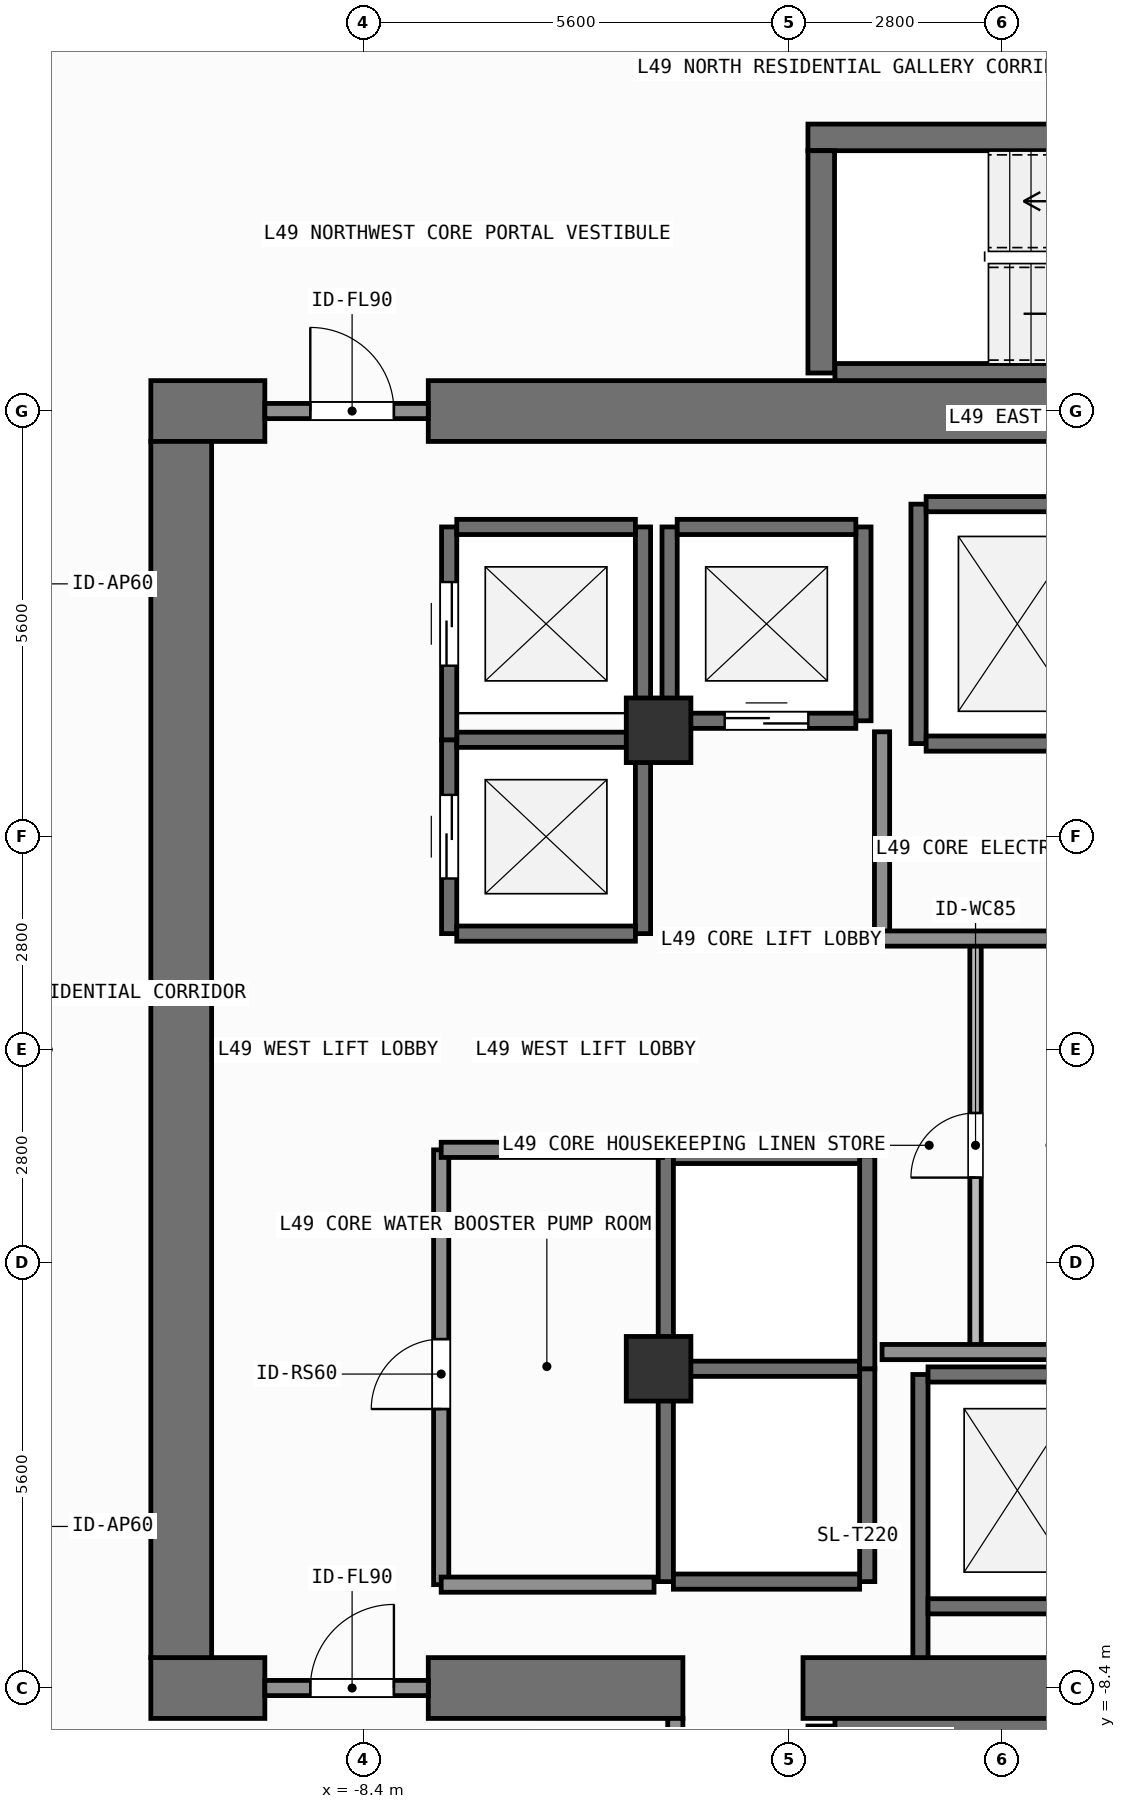
"""IFC4 building model, lengths in metres.
Left out: names, types, materials, properties, quantities, classifications, styles, units other than length and angle.
Written with IfcOpenShell. Run it as: python <this file> out.ifc"""

import sys

from ifc_helpers import new_model, si_unit, direction, frame, frame_2d, origin, origin_2d, place, context, subcontext, project, spatial, rectangle, extrude, element, fill, save


model = new_model("IFC4")
c1 = context("Model", 3, precision=1e-05, world=origin(), true_north=direction((0.0, 1.0)))
c2 = subcontext(c1, "Body", "Model", "MODEL_VIEW")
j1 = project(units=[si_unit("LENGTHUNIT", "METRE"), si_unit("PLANEANGLEUNIT", "RADIAN")], contexts=[c1])
p1 = place(None, origin())
s1 = spatial("IfcSite", under=j1, at=p1, CompositionType="ELEMENT")
p2 = place(p1, origin())
s2 = spatial("IfcBuilding", under=s1, at=p2, CompositionType="ELEMENT")
p3 = place(p2, frame((0.0, 0.0, 199.2)))
s3 = spatial("IfcBuildingStorey", under=s2, at=p3, CompositionType="ELEMENT", Elevation=199.2)
p4 = place(p3, frame((-11.2, -8.4, 0.0), z_axis=(0.0, 0.0, 1.0), x_axis=(1.0, 0.0, 0.0)))
e1 = element("IfcWall", 1, at=p4, inside=s3, PredefinedType="SHEAR", context=c2, shape_type="SweptSolid", body=[
    extrude(rectangle(XDim=1.5, YDim=0.8, at=frame_2d((0.75, 0.0))), origin(), (0.0, 0.0, 1.0), 3.9),
])
p5 = place(p3, frame((-7.55, -8.4, 0.0), z_axis=(0.0, 0.0, 1.0), x_axis=(1.0, 0.0, 0.0)))
e2 = element("IfcWall", 2, at=p5, inside=s3, PredefinedType="SHEAR", context=c2, shape_type="SweptSolid", body=[
    extrude(rectangle(XDim=3.35, YDim=0.8, at=frame_2d((1.675, 0.0))), origin(), (0.0, 0.0, 1.0), 3.9),
])
p6 = place(p3, frame((-2.62, -8.4, 0.0), z_axis=(0.0, 0.0, 1.0), x_axis=(1.0, 0.0, 0.0)))
e3 = element("IfcWall", 3, at=p6, inside=s3, PredefinedType="SHEAR", context=c2, shape_type="SweptSolid", body=[
    extrude(rectangle(XDim=7.27, YDim=0.8, at=frame_2d((3.635, 0.0))), origin(), (0.0, 0.0, 1.0), 3.9),
])
p7 = place(p3, frame((-11.2, 8.4, 0.0), z_axis=(0.0, 0.0, 1.0), x_axis=(1.0, 0.0, 0.0)))
e4 = element("IfcWall", 4, at=p7, inside=s3, PredefinedType="SHEAR", context=c2, shape_type="SweptSolid", body=[
    extrude(rectangle(XDim=1.5, YDim=0.8, at=frame_2d((0.75, 0.0))), origin(), (0.0, 0.0, 1.0), 3.9),
])
p8 = place(p3, frame((-7.55, 8.4, 0.0), z_axis=(0.0, 0.0, 1.0), x_axis=(1.0, 0.0, 0.0)))
e5 = element("IfcWall", 5, at=p8, inside=s3, PredefinedType="SHEAR", context=c2, shape_type="SweptSolid", body=[
    extrude(rectangle(XDim=16.35, YDim=0.8, at=frame_2d((8.175, 0.0))), origin(), (0.0, 0.0, 1.0), 3.9),
])
p9 = place(p3, frame((-10.8, -8.0, 0.0), z_axis=(0.0, 0.0, 1.0), x_axis=(0.0, 1.0, 0.0)))
e6 = element("IfcWall", 6, at=p9, inside=s3, PredefinedType="SHEAR", context=c2, shape_type="SweptSolid", body=[
    extrude(rectangle(XDim=16.0, YDim=0.8, at=frame_2d((8.0, 0.0))), origin(), (0.0, 0.0, 1.0), 3.9),
])
p10 = place(p3, frame((-2.2, -8.913, 0.0), z_axis=(0.0, 0.0, 1.0), x_axis=(1.0, 0.0, 0.0)))
e7 = element("IfcWall", 7, at=p10, inside=s3, PredefinedType="SHEAR", context=c2, shape_type="SweptSolid", body=[
    extrude(rectangle(XDim=6.6, YDim=0.225, at=frame_2d((3.3, 0.0))), origin(), (0.0, 0.0, 1.0), 3.9),
])
p11 = place(p3, frame((-2.38, -11.825, 0.0), z_axis=(0.0, 0.0, 1.0), x_axis=(0.0, 1.0, 0.0)))
e8 = element("IfcWall", 8, at=p11, inside=s3, PredefinedType="SHEAR", context=c2, shape_type="SweptSolid", body=[
    extrude(rectangle(XDim=2.925, YDim=0.35, at=frame_2d((1.462, 0.0))), origin(), (0.0, 0.0, 1.0), 3.9),
])
p12 = place(p3, frame((-2.555, 12.0, 0.0), z_axis=(0.0, 0.0, 1.0), x_axis=(1.0, 0.0, 0.0)))
e9 = element("IfcWall", 9, at=p12, inside=s3, PredefinedType="SHEAR", context=c2, shape_type="SweptSolid", body=[
    extrude(rectangle(XDim=7.31, YDim=0.35, at=frame_2d((3.655, 0.0))), origin(), (0.0, 0.0, 1.0), 3.9),
])
p13 = place(p3, frame((-2.2, 8.913, 0.0), z_axis=(0.0, 0.0, 1.0), x_axis=(1.0, 0.0, 0.0)))
e10 = element("IfcWall", 10, at=p13, inside=s3, PredefinedType="SHEAR", context=c2, shape_type="SweptSolid", body=[
    extrude(rectangle(XDim=6.6, YDim=0.225, at=frame_2d((3.3, 0.0))), origin(), (0.0, 0.0, 1.0), 3.9),
])
p14 = place(p3, frame((-2.38, 8.9, 0.0), z_axis=(0.0, 0.0, 1.0), x_axis=(0.0, 1.0, 0.0)))
e11 = element("IfcWall", 11, at=p14, inside=s3, PredefinedType="SHEAR", context=c2, shape_type="SweptSolid", body=[
    extrude(rectangle(XDim=2.925, YDim=0.35, at=frame_2d((1.462, 0.0))), origin(), (0.0, 0.0, 1.0), 3.9),
])
for number, where, z_axis, x_axis in (
    (12, (-4.52, -4.2, 0.0), (0.0, 0.0, 1.0), (1.0, 0.0, 0.0)),
    (13, (-4.52, 4.2, 0.0), (0.0, 0.0, 1.0), (1.0, 0.0, 0.0)),
):
    element("IfcColumn", number, at=place(p3, frame(where, z_axis=z_axis, x_axis=x_axis)), inside=s3, PredefinedType="COLUMN", context=c2, shape_type="SweptSolid", body=[
        extrude(rectangle(XDim=0.85, YDim=0.85, at=origin_2d()), origin(), (0.0, 0.0, 1.0), 3.9),
    ])
p15 = place(p3, frame((-7.275, 1.525, 0.0), z_axis=(0.0, 0.0, 1.0), x_axis=(0.0, 1.0, 0.0)))
e14 = element("IfcWall", 14, at=p15, inside=s3, PredefinedType="SHEAR", context=c2, shape_type="SweptSolid", body=[
    extrude(rectangle(XDim=2.55, YDim=0.2, at=frame_2d((1.275, 0.0))), origin(), (0.0, 0.0, 1.0), 3.68),
])
p16 = place(p15, frame((0.725, 0.0, 0.0)))
e15 = element("IfcOpeningElement", 15, at=p16, cuts=e14, PredefinedType="OPENING", context=c2, shape_type="SweptSolid", body=[
    extrude(rectangle(XDim=1.1, YDim=2.2, at=frame_2d((0.55, 1.1))), frame((0.0, 0.11, 0.0), z_axis=(0.0, -1.0, 0.0), x_axis=(1.0, 0.0, 0.0)), (0.0, 0.0, 1.0), 0.22),
])
p17 = place(p3, frame((-4.725, 1.525, 0.0), z_axis=(0.0, 0.0, 1.0), x_axis=(0.0, 1.0, 0.0)))
e16 = element("IfcWall", 16, at=p17, inside=s3, PredefinedType="SHEAR", context=c2, shape_type="SweptSolid", body=[
    extrude(rectangle(XDim=2.55, YDim=0.2, at=frame_2d((1.275, 0.0))), origin(), (0.0, 0.0, 1.0), 3.68),
])
for number, where, z_axis, x_axis in (
    (17, (-7.175, 1.525, 0.0), (0.0, 0.0, 1.0), (1.0, 0.0, 0.0)),
    (18, (-7.175, 4.075, 0.0), (0.0, 0.0, 1.0), (1.0, 0.0, 0.0)),
):
    element("IfcWall", number, at=place(p3, frame(where, z_axis=z_axis, x_axis=x_axis)), inside=s3, PredefinedType="SHEAR", context=c2, shape_type="SweptSolid", body=[
        extrude(rectangle(XDim=2.35, YDim=0.2, at=frame_2d((1.175, 0.0))), origin(), (0.0, 0.0, 1.0), 3.68),
    ])
p18 = place(p3, frame((-7.275, 4.075, 0.0), z_axis=(0.0, 0.0, 1.0), x_axis=(0.0, 1.0, 0.0)))
e19 = element("IfcWall", 19, at=p18, inside=s3, PredefinedType="SHEAR", context=c2, shape_type="SweptSolid", body=[
    extrude(rectangle(XDim=2.8, YDim=0.2, at=frame_2d((1.4, 0.0))), origin(), (0.0, 0.0, 1.0), 3.68),
])
p19 = place(p18, frame((0.975, 0.0, 0.0)))
e20 = element("IfcOpeningElement", 20, at=p19, cuts=e19, PredefinedType="OPENING", context=c2, shape_type="SweptSolid", body=[
    extrude(rectangle(XDim=1.1, YDim=2.2, at=frame_2d((0.55, 1.1))), frame((0.0, 0.11, 0.0), z_axis=(0.0, -1.0, 0.0), x_axis=(1.0, 0.0, 0.0)), (0.0, 0.0, 1.0), 0.22),
])
p20 = place(p3, frame((-4.725, 4.075, 0.0), z_axis=(0.0, 0.0, 1.0), x_axis=(0.0, 1.0, 0.0)))
e21 = element("IfcWall", 21, at=p20, inside=s3, PredefinedType="SHEAR", context=c2, shape_type="SweptSolid", body=[
    extrude(rectangle(XDim=2.8, YDim=0.2, at=frame_2d((1.4, 0.0))), origin(), (0.0, 0.0, 1.0), 3.68),
])
p21 = place(p3, frame((-7.175, 6.875, 0.0), z_axis=(0.0, 0.0, 1.0), x_axis=(1.0, 0.0, 0.0)))
e22 = element("IfcWall", 22, at=p21, inside=s3, PredefinedType="SHEAR", context=c2, shape_type="SweptSolid", body=[
    extrude(rectangle(XDim=2.35, YDim=0.2, at=frame_2d((1.175, 0.0))), origin(), (0.0, 0.0, 1.0), 3.68),
])
for number, where, z_axis, x_axis in (
    (23, (-4.375, 4.325, 0.0), (0.0, 0.0, 1.0), (0.0, 1.0, 0.0)),
    (24, (-1.825, 4.325, 0.0), (0.0, 0.0, 1.0), (0.0, 1.0, 0.0)),
):
    element("IfcWall", number, at=place(p3, frame(where, z_axis=z_axis, x_axis=x_axis)), inside=s3, PredefinedType="SHEAR", context=c2, shape_type="SweptSolid", body=[
        extrude(rectangle(XDim=2.55, YDim=0.2, at=frame_2d((1.275, 0.0))), origin(), (0.0, 0.0, 1.0), 3.68),
    ])
p22 = place(p3, frame((-4.275, 4.325, 0.0), z_axis=(0.0, 0.0, 1.0), x_axis=(1.0, 0.0, 0.0)))
e25 = element("IfcWall", 25, at=p22, inside=s3, PredefinedType="SHEAR", context=c2, shape_type="SweptSolid", body=[
    extrude(rectangle(XDim=2.35, YDim=0.2, at=frame_2d((1.175, 0.0))), origin(), (0.0, 0.0, 1.0), 3.68),
])
p23 = place(p22, frame((0.625, 0.0, 0.0)))
e26 = element("IfcOpeningElement", 26, at=p23, cuts=e25, PredefinedType="OPENING", context=c2, shape_type="SweptSolid", body=[
    extrude(rectangle(XDim=1.1, YDim=2.2, at=frame_2d((0.55, 1.1))), frame((0.0, 0.11, 0.0), z_axis=(0.0, -1.0, 0.0), x_axis=(1.0, 0.0, 0.0)), (0.0, 0.0, 1.0), 0.22),
])
p24 = place(p3, frame((-4.275, 6.875, 0.0), z_axis=(0.0, 0.0, 1.0), x_axis=(1.0, 0.0, 0.0)))
e27 = element("IfcWall", 27, at=p24, inside=s3, PredefinedType="SHEAR", context=c2, shape_type="SweptSolid", body=[
    extrude(rectangle(XDim=2.35, YDim=0.2, at=frame_2d((1.175, 0.0))), origin(), (0.0, 0.0, 1.0), 3.68),
])
for number, where, z_axis, x_axis in (
    (28, (-4.425, -7.0, 0.0), (0.0, 0.0, 1.0), (0.0, 1.0, 0.0)),
    (29, (-1.775, -7.0, 0.0), (0.0, 0.0, 1.0), (0.0, 1.0, 0.0)),
):
    element("IfcWall", number, at=place(p3, frame(where, z_axis=z_axis, x_axis=x_axis)), inside=s3, PredefinedType="SHEAR", context=c2, shape_type="SweptSolid", body=[
        extrude(rectangle(XDim=2.8, YDim=0.2, at=frame_2d((1.4, 0.0))), origin(), (0.0, 0.0, 1.0), 3.68),
    ])
for number, where, z_axis, x_axis in (
    (30, (-4.325, -7.0, 0.0), (0.0, 0.0, 1.0), (1.0, 0.0, 0.0)),
    (31, (-4.325, -4.2, 0.0), (0.0, 0.0, 1.0), (1.0, 0.0, 0.0)),
):
    element("IfcWall", number, at=place(p3, frame(where, z_axis=z_axis, x_axis=x_axis)), inside=s3, PredefinedType="SHEAR", context=c2, shape_type="SweptSolid", body=[
        extrude(rectangle(XDim=2.45, YDim=0.2, at=frame_2d((1.225, 0.0))), origin(), (0.0, 0.0, 1.0), 3.68),
    ])
for number, where, z_axis, x_axis in (
    (32, (-4.425, -4.2, 0.0), (0.0, 0.0, 1.0), (0.0, 1.0, 0.0)),
    (33, (-1.775, -4.2, 0.0), (0.0, 0.0, 1.0), (0.0, 1.0, 0.0)),
):
    element("IfcWall", number, at=place(p3, frame(where, z_axis=z_axis, x_axis=x_axis)), inside=s3, PredefinedType="SHEAR", context=c2, shape_type="SweptSolid", body=[
        extrude(rectangle(XDim=2.8, YDim=0.2, at=frame_2d((1.4, 0.0))), origin(), (0.0, 0.0, 1.0), 3.68),
    ])
p25 = place(p3, frame((-4.325, -1.4, 0.0), z_axis=(0.0, 0.0, 1.0), x_axis=(1.0, 0.0, 0.0)))
e34 = element("IfcWall", 34, at=p25, inside=s3, PredefinedType="SHEAR", context=c2, shape_type="SweptSolid", body=[
    extrude(rectangle(XDim=2.45, YDim=0.2, at=frame_2d((1.225, 0.0))), origin(), (0.0, 0.0, 1.0), 3.68),
])
p26 = place(p3, frame((-1.1, 4.025, 0.0), z_axis=(0.0, 0.0, 1.0), x_axis=(0.0, 1.0, 0.0)))
e35 = element("IfcWall", 35, at=p26, inside=s3, PredefinedType="SHEAR", context=c2, shape_type="SweptSolid", body=[
    extrude(rectangle(XDim=3.15, YDim=0.2, at=frame_2d((1.575, 0.0))), origin(), (0.0, 0.0, 1.0), 3.68),
])
for number, where, z_axis, x_axis in (
    (36, (-1.0, 4.025, 0.0), (0.0, 0.0, 1.0), (1.0, 0.0, 0.0)),
    (37, (-1.0, 7.175, 0.0), (0.0, 0.0, 1.0), (1.0, 0.0, 0.0)),
):
    element("IfcWall", number, at=place(p3, frame(where, z_axis=z_axis, x_axis=x_axis)), inside=s3, PredefinedType="SHEAR", context=c2, shape_type="SweptSolid", body=[
        extrude(rectangle(XDim=2.4, YDim=0.2, at=frame_2d((1.2, 0.0))), origin(), (0.0, 0.0, 1.0), 3.68),
    ])
p27 = place(p3, frame((-1.075, -8.0, 0.0), z_axis=(0.0, 0.0, 1.0), x_axis=(0.0, 1.0, 0.0)))
e38 = element("IfcWall", 38, at=p27, inside=s3, PredefinedType="SHEAR", context=c2, shape_type="SweptSolid", body=[
    extrude(rectangle(XDim=3.725, YDim=0.2, at=frame_2d((1.863, 0.0))), origin(), (0.0, 0.0, 1.0), 3.68),
])
for number, where, z_axis, x_axis in (
    (39, (-0.975, -7.325, 0.0), (0.0, 0.0, 1.0), (1.0, 0.0, 0.0)),
    (40, (-0.975, -4.275, 0.0), (0.0, 0.0, 1.0), (1.0, 0.0, 0.0)),
):
    element("IfcWall", number, at=place(p3, frame(where, z_axis=z_axis, x_axis=x_axis)), inside=s3, PredefinedType="SHEAR", context=c2, shape_type="SweptSolid", body=[
        extrude(rectangle(XDim=2.35, YDim=0.2, at=frame_2d((1.175, 0.0))), origin(), (0.0, 0.0, 1.0), 3.68),
    ])
p28 = place(p3, frame((-9.7, -8.4, 0.0), z_axis=(0.0, 0.0, 1.0), x_axis=(1.0, 0.0, 0.0)))
e41 = element("IfcWall", 41, at=p28, inside=s3, PredefinedType="SOLIDWALL", context=c2, shape_type="SweptSolid", body=[
    extrude(rectangle(XDim=2.15, YDim=0.2, at=frame_2d((1.075, 0.0))), origin(), (0.0, 0.0, 1.0), 2.82),
])
p29 = place(p28, frame((0.598, 0.0, 0.0)))
e42 = element("IfcOpeningElement", 42, at=p29, cuts=e41, PredefinedType="OPENING", context=c2, shape_type="SweptSolid", body=[
    extrude(rectangle(XDim=1.1, YDim=2.15, at=frame_2d((0.55, 1.075))), frame((0.0, 0.11, 0.0), z_axis=(0.0, -1.0, 0.0), x_axis=(1.0, 0.0, 0.0)), (0.0, 0.0, 1.0), 0.22),
])
p30 = place(p3, frame((-9.7, 8.4, 0.0), z_axis=(0.0, 0.0, 1.0), x_axis=(1.0, 0.0, 0.0)))
e43 = element("IfcWall", 43, at=p30, inside=s3, PredefinedType="SOLIDWALL", context=c2, shape_type="SweptSolid", body=[
    extrude(rectangle(XDim=2.15, YDim=0.2, at=frame_2d((1.075, 0.0))), origin(), (0.0, 0.0, 1.0), 2.82),
])
p31 = place(p30, frame((0.598, 0.0, 0.0)))
e44 = element("IfcOpeningElement", 44, at=p31, cuts=e43, PredefinedType="OPENING", context=c2, shape_type="SweptSolid", body=[
    extrude(rectangle(XDim=1.1, YDim=2.15, at=frame_2d((0.55, 1.075))), frame((0.0, 0.11, 0.0), z_axis=(0.0, -1.0, 0.0), x_axis=(1.0, 0.0, 0.0)), (0.0, 0.0, 1.0), 0.22),
])
p32 = place(p3, frame((-0.35, -3.98, 0.0), z_axis=(0.0, 0.0, 1.0), x_axis=(0.0, 1.0, 0.0)))
e45 = element("IfcWall", 45, at=p32, inside=s3, PredefinedType="PARTITIONING", context=c2, shape_type="SweptSolid", body=[
    extrude(rectangle(XDim=5.44, YDim=0.15, at=frame_2d((2.72, 0.0))), origin(), (0.0, 0.0, 1.0), 3.68),
])
p33 = place(p32, frame((2.295, 0.0, 0.0)))
e46 = element("IfcOpeningElement", 46, at=p33, cuts=e45, PredefinedType="OPENING", context=c2, shape_type="SweptSolid", body=[
    extrude(rectangle(XDim=0.85, YDim=2.1, at=frame_2d((0.425, 1.05))), frame((0.0, 0.085, 0.0), z_axis=(0.0, -1.0, 0.0), x_axis=(1.0, 0.0, 0.0)), (0.0, 0.0, 1.0), 0.17),
])
p34 = place(p3, frame((-7.38, -7.04, 0.0), z_axis=(0.0, 0.0, 1.0), x_axis=(0.0, 1.0, 0.0)))
e47 = element("IfcWall", 47, at=p34, inside=s3, PredefinedType="SOLIDWALL", context=c2, shape_type="SweptSolid", body=[
    extrude(rectangle(XDim=5.72, YDim=0.2, at=frame_2d((2.86, 0.0))), origin(), (0.0, 0.0, 1.0), 3.68),
])
p35 = place(p34, frame((2.31, 0.0, 0.0)))
e48 = element("IfcOpeningElement", 48, at=p35, cuts=e47, PredefinedType="OPENING", context=c2, shape_type="SweptSolid", body=[
    extrude(rectangle(XDim=0.92, YDim=2.1, at=frame_2d((0.46, 1.05))), frame((0.0, 0.11, 0.0), z_axis=(0.0, -1.0, 0.0), x_axis=(1.0, 0.0, 0.0)), (0.0, 0.0, 1.0), 0.22),
])
p36 = place(p3, frame((-4.3, -12.06, 0.0), z_axis=(0.0, 0.0, 1.0), x_axis=(0.0, 1.0, 0.0)))
e49 = element("IfcWall", 49, at=p36, inside=s3, PredefinedType="SOLIDWALL", context=c2, shape_type="SweptSolid", body=[
    extrude(rectangle(XDim=3.26, YDim=0.2, at=frame_2d((1.63, 0.0))), origin(), (0.0, 0.0, 1.0), 3.68),
])
p37 = place(p3, frame((-7.38, -1.32, 0.0), z_axis=(0.0, 0.0, 1.0), x_axis=(1.0, 0.0, 0.0)))
e50 = element("IfcWall", 50, at=p37, inside=s3, PredefinedType="SOLIDWALL", context=c2, shape_type="SweptSolid", body=[
    extrude(rectangle(XDim=2.91, YDim=0.2, at=frame_2d((1.455, 0.0))), origin(), (0.0, 0.0, 1.0), 3.68),
])
p38 = place(p3, frame((-1.58, 1.48, 0.0), z_axis=(0.0, 0.0, 1.0), x_axis=(0.0, 1.0, 0.0)))
e51 = element("IfcWall", 51, at=p38, inside=s3, PredefinedType="SOLIDWALL", context=c2, shape_type="SweptSolid", body=[
    extrude(rectangle(XDim=2.7, YDim=0.2, at=frame_2d((1.35, 0.0))), origin(), (0.0, 0.0, 1.0), 3.68),
])
for number, where, z_axis, x_axis in (
    (52, (-1.58, -3.98, 0.0), (0.0, 0.0, 1.0), (1.0, 0.0, 0.0)),
    (53, (-1.58, 1.46, 0.0), (0.0, 0.0, 1.0), (1.0, 0.0, 0.0)),
):
    element("IfcWall", number, at=place(p3, frame(where, z_axis=z_axis, x_axis=x_axis)), inside=s3, PredefinedType="SOLIDWALL", context=c2, shape_type="SweptSolid", body=[
        extrude(rectangle(XDim=3.19, YDim=0.2, at=frame_2d((1.595, 0.0))), origin(), (0.0, 0.0, 1.0), 3.68),
    ])
p39 = place(p3, frame((-7.38, -7.04, 0.0), z_axis=(0.0, 0.0, 1.0), x_axis=(1.0, 0.0, 0.0)))
e54 = element("IfcWall", 54, at=p39, inside=s3, PredefinedType="SOLIDWALL", context=c2, shape_type="SweptSolid", body=[
    extrude(rectangle(XDim=2.8, YDim=0.2, at=frame_2d((1.4, 0.0))), origin(), (0.0, 0.0, 1.0), 3.68),
])
p40 = place(p16, origin())
e55 = element("IfcDoor", 55, at=p40, inside=s3, OperationType="SLIDING_TO_LEFT", PredefinedType="DOOR", context=c2, shape_type="SweptSolid", body=[
    extrude(rectangle(XDim=1.1, YDim=2.2, at=frame_2d((0.55, 1.1))), frame((0.0, 0.025, 0.0), z_axis=(0.0, -1.0, 0.0), x_axis=(1.0, 0.0, 0.0)), (0.0, 0.0, 1.0), 0.05),
])
fill(e15, e55)
p41 = place(p19, origin())
e56 = element("IfcDoor", 56, at=p41, inside=s3, OperationType="SLIDING_TO_LEFT", PredefinedType="DOOR", context=c2, shape_type="SweptSolid", body=[
    extrude(rectangle(XDim=1.1, YDim=2.2, at=frame_2d((0.55, 1.1))), frame((0.0, 0.025, 0.0), z_axis=(0.0, -1.0, 0.0), x_axis=(1.0, 0.0, 0.0)), (0.0, 0.0, 1.0), 0.05),
])
fill(e20, e56)
p42 = place(p23, origin())
e57 = element("IfcDoor", 57, at=p42, inside=s3, OperationType="SLIDING_TO_LEFT", PredefinedType="DOOR", context=c2, shape_type="SweptSolid", body=[
    extrude(rectangle(XDim=1.1, YDim=2.2, at=frame_2d((0.55, 1.1))), frame((0.0, 0.025, 0.0), z_axis=(0.0, -1.0, 0.0), x_axis=(1.0, 0.0, 0.0)), (0.0, 0.0, 1.0), 0.05),
])
fill(e26, e57)
p43 = place(p29, origin())
e58 = element("IfcDoor", 58, at=p43, inside=s3, OperationType="SINGLE_SWING_RIGHT", PredefinedType="DOOR", context=c2, shape_type="SweptSolid", body=[
    extrude(rectangle(XDim=1.1, YDim=2.15, at=frame_2d((0.55, 1.075))), frame((0.0, 0.025, 0.0), z_axis=(0.0, -1.0, 0.0), x_axis=(1.0, 0.0, 0.0)), (0.0, 0.0, 1.0), 0.05),
])
fill(e42, e58)
p44 = place(p31, origin())
e59 = element("IfcDoor", 59, at=p44, inside=s3, OperationType="SINGLE_SWING_LEFT", PredefinedType="DOOR", context=c2, shape_type="SweptSolid", body=[
    extrude(rectangle(XDim=1.1, YDim=2.15, at=frame_2d((0.55, 1.075))), frame((0.0, 0.025, 0.0), z_axis=(0.0, -1.0, 0.0), x_axis=(1.0, 0.0, 0.0)), (0.0, 0.0, 1.0), 0.05),
])
fill(e44, e59)
p45 = place(p33, origin())
e60 = element("IfcDoor", 60, at=p45, inside=s3, OperationType="SINGLE_SWING_LEFT", PredefinedType="DOOR", context=c2, shape_type="SweptSolid", body=[
    extrude(rectangle(XDim=0.85, YDim=2.1, at=frame_2d((0.425, 1.05))), frame((0.0, 0.025, 0.0), z_axis=(0.0, -1.0, 0.0), x_axis=(1.0, 0.0, 0.0)), (0.0, 0.0, 1.0), 0.05),
])
fill(e46, e60)
p46 = place(p35, origin())
e61 = element("IfcDoor", 61, at=p46, inside=s3, OperationType="SINGLE_SWING_LEFT", PredefinedType="DOOR", context=c2, shape_type="SweptSolid", body=[
    extrude(rectangle(XDim=0.92, YDim=2.1, at=frame_2d((0.46, 1.05))), frame((0.0, 0.025, 0.0), z_axis=(0.0, -1.0, 0.0), x_axis=(1.0, 0.0, 0.0)), (0.0, 0.0, 1.0), 0.05),
])
fill(e48, e61)
save(model, sys.argv[1])
